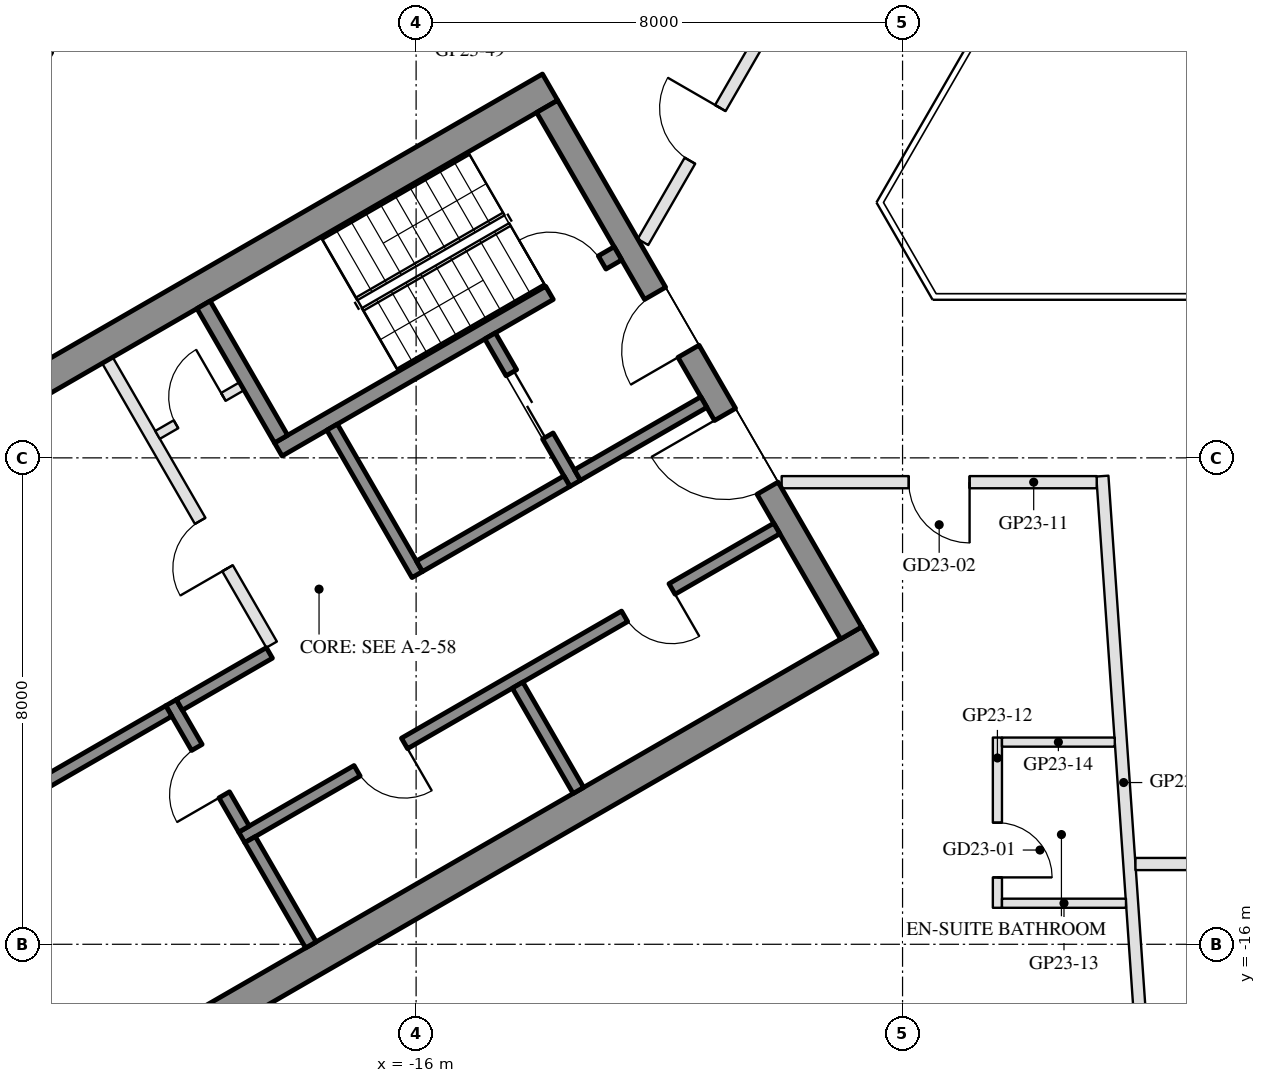
"""IFC4 building model, lengths in metres.
Left out: names, types, materials, properties, quantities, classifications, styles, units other than length and angle.
Written with IfcOpenShell. Run it as: python <this file> out.ifc"""

import sys

from ifc_helpers import new_model, si_unit, direction, frame, frame_2d, origin, place, context, subcontext, project, spatial, rectangle, extrude, element, fill, save


model = new_model("IFC4")
c1 = context("Model", 3, precision=1e-05, world=origin(), true_north=direction((0.0, 1.0)))
c2 = subcontext(c1, "Body", "Model", "MODEL_VIEW")
j1 = project(units=[si_unit("LENGTHUNIT", "METRE"), si_unit("PLANEANGLEUNIT", "RADIAN")], contexts=[c1])
p1 = place(None, origin())
s1 = spatial("IfcSite", under=j1, at=p1, CompositionType="ELEMENT")
p2 = place(p1, origin())
s2 = spatial("IfcBuilding", under=s1, at=p2, CompositionType="ELEMENT")
p3 = place(p2, frame((0.0, 0.0, 250.4)))
s3 = spatial("IfcBuildingStorey", under=s2, at=p3, CompositionType="ELEMENT", Elevation=250.4)
p4 = place(p3, frame((-20.309, 1.934, 0.0), z_axis=(0.0, 0.0, 1.0), x_axis=(-0.499992114976, -0.866029956157, 0.0)))
e1 = element("IfcWall", 1, at=p4, inside=s3, PredefinedType="SOLIDWALL", context=c2, shape_type="SweptSolid", body=[
    extrude(rectangle(XDim=6.74, YDim=0.35, at=frame_2d((3.37, 0.0))), origin(), (0.0, 0.0, 1.0), 3.55),
])
p5 = place(p4, frame((4.02, 0.0, 0.0)))
e2 = element("IfcOpeningElement", 2, at=p5, cuts=e1, PredefinedType="OPENING", context=c2, shape_type="SweptSolid", body=[
    extrude(rectangle(XDim=2.4, YDim=2.4, at=frame_2d((1.2, 1.2))), frame((0.0, 0.185, 0.0), z_axis=(0.0, -1.0, 0.0), x_axis=(1.0, 0.0, 0.0)), (0.0, 0.0, 1.0), 0.37),
])
p6 = place(p4, frame((0.77, 0.0, 0.3)))
e3 = element("IfcOpeningElement", 3, at=p6, cuts=e1, PredefinedType="OPENING", context=c2, shape_type="SweptSolid", body=[
    extrude(rectangle(XDim=2.9, YDim=2.65, at=frame_2d((1.45, 1.325))), frame((0.0, 0.185, 0.0), z_axis=(0.0, -1.0, 0.0), x_axis=(1.0, 0.0, 0.0)), (0.0, 0.0, 1.0), 0.37),
])
for number, where, z_axis, x_axis in (
    (4, (-13.797, -1.903, 0.0), (0.0, 0.0, 1.0), (-0.866, -0.5, 0.0)),
    (5, (-8.547, -10.997, 0.0), (0.0, 0.0, 1.0), (-0.866, -0.5, 0.0)),
):
    element("IfcWall", number, at=place(p3, frame(where, z_axis=z_axis, x_axis=x_axis)), inside=s3, PredefinedType="SHEAR", context=c2, shape_type="SweptSolid", body=[
        extrude(rectangle(XDim=14.837, YDim=0.5, at=frame_2d((7.418, 0.0))), origin(), (0.0, 0.0, 1.0), 3.5),
    ])
p7 = place(p3, frame((-13.845, -2.22, 0.0), z_axis=(0.0, 0.0, 1.0), x_axis=(0.500004234368, -0.866022959057, 0.0)))
e6 = element("IfcWall", 6, at=p7, inside=s3, PredefinedType="SHEAR", context=c2, shape_type="SweptSolid", body=[
    extrude(rectangle(XDim=10.0, YDim=0.4, at=frame_2d((5.0, 0.0))), origin(), (0.0, 0.0, 1.0), 3.5),
])
p8 = place(p7, frame((3.55, 0.0, 0.0)))
e7 = element("IfcOpeningElement", 7, at=p8, cuts=e6, PredefinedType="OPENING", context=c2, shape_type="SweptSolid", body=[
    extrude(rectangle(XDim=1.1, YDim=2.1, at=frame_2d((0.55, 1.05))), frame((0.0, 0.21, 0.0), z_axis=(0.0, -1.0, 0.0), x_axis=(1.0, 0.0, 0.0)), (0.0, 0.0, 1.0), 0.42),
])
p9 = place(p7, frame((5.85, 0.0, 0.0)))
e8 = element("IfcOpeningElement", 8, at=p9, cuts=e6, PredefinedType="OPENING", context=c2, shape_type="SweptSolid", body=[
    extrude(rectangle(XDim=1.4, YDim=2.1, at=frame_2d((0.7, 1.05))), frame((0.0, 0.21, 0.0), z_axis=(0.0, -1.0, 0.0), x_axis=(1.0, 0.0, 0.0)), (0.0, 0.0, 1.0), 0.42),
])
p10 = place(p3, frame((-12.681, -4.636, 0.0), z_axis=(0.0, 0.0, 1.0), x_axis=(-0.866021702275, -0.500006411147, 0.0)))
e9 = element("IfcWall", 9, at=p10, inside=s3, PredefinedType="SHEAR", context=c2, shape_type="SweptSolid", body=[
    extrude(rectangle(XDim=6.45, YDim=0.25, at=frame_2d((3.225, 0.0))), origin(), (0.0, 0.0, 1.0), 3.5),
])
p11 = place(p10, frame((0.3, 0.0, 0.0)))
e10 = element("IfcOpeningElement", 10, at=p11, cuts=e9, PredefinedType="OPENING", context=c2, shape_type="SweptSolid", body=[
    extrude(rectangle(XDim=1.0, YDim=2.1, at=frame_2d((0.5, 1.05))), frame((0.0, 0.135, 0.0), z_axis=(0.0, -1.0, 0.0), x_axis=(1.0, 0.0, 0.0)), (0.0, 0.0, 1.0), 0.27),
])
p12 = place(p3, frame((-19.496, -5.482, 0.0), z_axis=(0.0, 0.0, 1.0), x_axis=(0.499990435942, -0.866030925526, 0.0)))
e11 = element("IfcWall", 11, at=p12, inside=s3, PredefinedType="SHEAR", context=c2, shape_type="SweptSolid", body=[
    extrude(rectangle(XDim=2.55, YDim=0.25, at=frame_2d((1.275, 0.0))), origin(), (0.0, 0.0, 1.0), 3.5),
])
p13 = place(p3, frame((-17.381, -7.495, 0.0), z_axis=(0.0, 0.0, 1.0), x_axis=(0.500011755427, -0.866018616679, 0.0)))
e12 = element("IfcWall", 12, at=p13, inside=s3, PredefinedType="SHEAR", context=c2, shape_type="SweptSolid", body=[
    extrude(rectangle(XDim=2.8, YDim=0.2, at=frame_2d((1.4, 0.0))), origin(), (0.0, 0.0, 1.0), 3.5),
])
p14 = place(p3, frame((-14.783, -5.995, 0.0), z_axis=(0.0, 0.0, 1.0), x_axis=(0.49994636267, -0.866056369097, 0.0)))
e13 = element("IfcWall", 13, at=p14, inside=s3, PredefinedType="SHEAR", context=c2, shape_type="SweptSolid", body=[
    extrude(rectangle(XDim=2.8, YDim=0.2, at=frame_2d((1.4, 0.0))), origin(), (0.0, 0.0, 1.0), 3.5),
])
p15 = place(p14, frame((0.7, 0.0, 0.0)))
e14 = element("IfcOpeningElement", 14, at=p15, cuts=e13, PredefinedType="OPENING", context=c2, shape_type="SweptSolid", body=[
    extrude(rectangle(XDim=1.2, YDim=2.1, at=frame_2d((0.6, 1.05))), frame((0.0, 0.11, 0.0), z_axis=(0.0, -1.0, 0.0), x_axis=(1.0, 0.0, 0.0)), (0.0, 0.0, 1.0), 0.22),
])
p16 = place(p3, frame((-13.52, -8.383, 0.0), z_axis=(0.0, 0.0, 1.0), x_axis=(-0.866034573852, -0.49998411664, 0.0)))
e15 = element("IfcWall", 15, at=p16, inside=s3, PredefinedType="SHEAR", context=c2, shape_type="SweptSolid", body=[
    extrude(rectangle(XDim=2.8, YDim=0.2, at=frame_2d((1.4, 0.0))), origin(), (0.0, 0.0, 1.0), 3.5),
])
p17 = place(p3, frame((-11.268, -7.083, 0.0), z_axis=(0.0, 0.0, 1.0), x_axis=(-0.866050077142, -0.499957262057, 0.0)))
e16 = element("IfcWall", 16, at=p17, inside=s3, PredefinedType="SHEAR", context=c2, shape_type="SweptSolid", body=[
    extrude(rectangle(XDim=2.4, YDim=0.2, at=frame_2d((1.2, 0.0))), origin(), (0.0, 0.0, 1.0), 3.5),
])
p18 = place(p3, frame((-10.068, -9.162, 0.0), z_axis=(0.0, 0.0, 1.0), x_axis=(-0.866032725843, -0.499987317609, 0.0)))
e17 = element("IfcWall", 17, at=p18, inside=s3, PredefinedType="SHEAR", context=c2, shape_type="SweptSolid", body=[
    extrude(rectangle(XDim=10.16, YDim=0.2, at=frame_2d((5.08, 0.0))), origin(), (0.0, 0.0, 1.0), 3.5),
])
p19 = place(p18, frame((1.99, 0.0, 0.0)))
e18 = element("IfcOpeningElement", 18, at=p19, cuts=e17, PredefinedType="OPENING", context=c2, shape_type="SweptSolid", body=[
    extrude(rectangle(XDim=0.9, YDim=2.1, at=frame_2d((0.45, 1.05))), frame((0.0, 0.11, 0.0), z_axis=(0.0, -1.0, 0.0), x_axis=(1.0, 0.0, 0.0)), (0.0, 0.0, 1.0), 0.22),
])
p20 = place(p18, frame((7.07, 0.0, 0.0)))
e19 = element("IfcOpeningElement", 19, at=p20, cuts=e17, PredefinedType="OPENING", context=c2, shape_type="SweptSolid", body=[
    extrude(rectangle(XDim=0.9, YDim=2.1, at=frame_2d((0.45, 1.05))), frame((0.0, 0.11, 0.0), z_axis=(0.0, -1.0, 0.0), x_axis=(1.0, 0.0, 0.0)), (0.0, 0.0, 1.0), 0.22),
])
p21 = place(p3, frame((-20.031, -12.026, 0.0), z_axis=(0.0, 0.0, 1.0), x_axis=(0.500033551112, -0.866006032174, 0.0)))
e20 = element("IfcWall", 20, at=p21, inside=s3, PredefinedType="SHEAR", context=c2, shape_type="SweptSolid", body=[
    extrude(rectangle(XDim=2.4, YDim=0.2, at=frame_2d((1.2, 0.0))), origin(), (0.0, 0.0, 1.0), 3.5),
])
p22 = place(p21, frame((0.85, 0.0, 0.0)))
e21 = element("IfcOpeningElement", 21, at=p22, cuts=e20, PredefinedType="OPENING", context=c2, shape_type="SweptSolid", body=[
    extrude(rectangle(XDim=0.9, YDim=2.1, at=frame_2d((0.45, 1.05))), frame((0.0, 0.11, 0.0), z_axis=(0.0, -1.0, 0.0), x_axis=(1.0, 0.0, 0.0)), (0.0, 0.0, 1.0), 0.22),
])
p23 = place(p3, frame((-18.413, -11.208, 0.0), z_axis=(0.0, 0.0, 1.0), x_axis=(-0.866038183914, -0.499977863513, 0.0)))
e22 = element("IfcWall", 22, at=p23, inside=s3, PredefinedType="SHEAR", context=c2, shape_type="SweptSolid", body=[
    extrude(rectangle(XDim=1.71, YDim=0.2, at=frame_2d((0.855, 0.0))), origin(), (0.0, 0.0, 1.0), 3.5),
])
for number, where, z_axis, x_axis in (
    (23, (-14.331, -11.738, 0.0), (0.0, 0.0, 1.0), (0.5, -0.866, 0.0)),
    (24, (-18.73, -14.278, 0.0), (0.0, 0.0, 1.0), (0.5, -0.866, 0.0)),
):
    element("IfcWall", number, at=place(p3, frame(where, z_axis=z_axis, x_axis=x_axis)), inside=s3, PredefinedType="SHEAR", context=c2, shape_type="SweptSolid", body=[
        extrude(rectangle(XDim=2.0, YDim=0.2, at=frame_2d((1.0, 0.0))), origin(), (0.0, 0.0, 1.0), 3.5),
    ])
p24 = place(p3, frame((-20.067, -12.163, 0.0), z_axis=(0.0, 0.0, 1.0), x_axis=(-0.866030456496, -0.499991248344, 0.0)))
e25 = element("IfcWall", 25, at=p24, inside=s3, PredefinedType="SHEAR", context=c2, shape_type="SweptSolid", body=[
    extrude(rectangle(XDim=3.04, YDim=0.2, at=frame_2d((1.52, 0.0))), origin(), (0.0, 0.0, 1.0), 3.5),
])
p25 = place(p3, frame((-21.076, -6.395, 0.0), z_axis=(0.0, 0.0, 1.0), x_axis=(0.50001468107, -0.866016927499, 0.0)))
e26 = element("IfcWall", 26, at=p25, inside=s3, PredefinedType="PARTITIONING", context=c2, shape_type="SweptSolid", body=[
    extrude(rectangle(XDim=5.4, YDim=0.2, at=frame_2d((2.7, 0.0))), origin(), (0.0, 0.0, 1.0), 3.5),
])
p26 = place(p25, frame((3.05, 0.0, 0.0)))
e27 = element("IfcOpeningElement", 27, at=p26, cuts=e26, PredefinedType="OPENING", context=c2, shape_type="SweptSolid", body=[
    extrude(rectangle(XDim=0.9, YDim=2.1, at=frame_2d((0.45, 1.05))), frame((0.0, 0.11, 0.0), z_axis=(0.0, -1.0, 0.0), x_axis=(1.0, 0.0, 0.0)), (0.0, 0.0, 1.0), 0.22),
])
p27 = place(p3, frame((-18.866, -6.822, 0.0), z_axis=(0.0, 0.0, 1.0), x_axis=(-0.866028054938, -0.499995408039, 0.0)))
e28 = element("IfcWall", 28, at=p27, inside=s3, PredefinedType="PARTITIONING", context=c2, shape_type="SweptSolid", body=[
    extrude(rectangle(XDim=1.6, YDim=0.15, at=frame_2d((0.8, 0.0))), origin(), (0.0, 0.0, 1.0), 3.5),
])
p28 = place(p27, frame((0.35, 0.0, 0.0)))
e29 = element("IfcOpeningElement", 29, at=p28, cuts=e28, PredefinedType="OPENING", context=c2, shape_type="SweptSolid", body=[
    extrude(rectangle(XDim=0.9, YDim=2.1, at=frame_2d((0.45, 1.05))), frame((0.0, 0.085, 0.0), z_axis=(0.0, -1.0, 0.0), x_axis=(1.0, 0.0, 0.0)), (0.0, 0.0, 1.0), 0.17),
])
p29 = place(p3, frame((-4.013, -18.38, 0.0), z_axis=(0.0, 0.0, 1.0), x_axis=(-0.06939415619, 0.997589319854, 0.0)))
e30 = element("IfcWall", 30, at=p29, inside=s3, PredefinedType="PARTITIONING", context=c2, shape_type="SweptSolid", body=[
    extrude(rectangle(XDim=10.104, YDim=0.2, at=frame_2d((5.052, 0.0))), origin(), (0.0, 0.0, 1.0), 2.95),
])
p30 = place(p3, frame((-4.807, -8.4, 0.0), z_axis=(0.0, 0.0, 1.0), x_axis=(-1.0, 0.0, 0.0)))
e31 = element("IfcWall", 31, at=p30, inside=s3, PredefinedType="PARTITIONING", context=c2, shape_type="SweptSolid", body=[
    extrude(rectangle(XDim=5.181, YDim=0.2, at=frame_2d((2.591, 0.0))), origin(), (0.0, 0.0, 1.0), 2.95),
])
p31 = place(p30, frame((2.091, 0.0, 0.0)))
e32 = element("IfcOpeningElement", 32, at=p31, cuts=e31, PredefinedType="OPENING", context=c2, shape_type="SweptSolid", body=[
    extrude(rectangle(XDim=1.0, YDim=2.1, at=frame_2d((0.5, 1.05))), frame((0.0, 0.11, 0.0), z_axis=(0.0, -1.0, 0.0), x_axis=(1.0, 0.0, 0.0)), (0.0, 0.0, 1.0), 0.22),
])
p32 = place(p3, frame((-6.44, -12.6, 0.0), z_axis=(0.0, 0.0, 1.0), x_axis=(0.0, -1.0, 0.0)))
e33 = element("IfcWall", 33, at=p32, inside=s3, PredefinedType="PARTITIONING", context=c2, shape_type="SweptSolid", body=[
    extrude(rectangle(XDim=2.8, YDim=0.15, at=frame_2d((1.4, 0.0))), origin(), (0.0, 0.0, 1.0), 3.55),
])
p33 = place(p32, frame((1.4, 0.0, 0.0)))
e34 = element("IfcOpeningElement", 34, at=p33, cuts=e33, PredefinedType="OPENING", context=c2, shape_type="SweptSolid", body=[
    extrude(rectangle(XDim=0.9, YDim=2.1, at=frame_2d((0.45, 1.05))), frame((0.0, 0.085, 0.0), z_axis=(0.0, -1.0, 0.0), x_axis=(1.0, 0.0, 0.0)), (0.0, 0.0, 1.0), 0.17),
])
p34 = place(p3, frame((-6.365, -15.325, 0.0), z_axis=(0.0, 0.0, 1.0), x_axis=(1.0, 0.0, 0.0)))
e35 = element("IfcWall", 35, at=p34, inside=s3, PredefinedType="PARTITIONING", context=c2, shape_type="SweptSolid", body=[
    extrude(rectangle(XDim=2.04, YDim=0.15, at=frame_2d((1.02, 0.0))), origin(), (0.0, 0.0, 1.0), 3.55),
])
p35 = place(p3, frame((-6.365, -12.675, 0.0), z_axis=(0.0, 0.0, 1.0), x_axis=(1.0, 0.0, 0.0)))
e36 = element("IfcWall", 36, at=p35, inside=s3, PredefinedType="PARTITIONING", context=c2, shape_type="SweptSolid", body=[
    extrude(rectangle(XDim=1.855, YDim=0.15, at=frame_2d((0.928, 0.0))), origin(), (0.0, 0.0, 1.0), 3.55),
])
p36 = place(p3, frame((0.955, -14.68, 0.0), z_axis=(0.0, 0.0, 1.0), x_axis=(-1.0, 0.0, 0.0)))
e37 = element("IfcWall", 37, at=p36, inside=s3, PredefinedType="PARTITIONING", context=c2, shape_type="SweptSolid", body=[
    extrude(rectangle(XDim=5.125, YDim=0.2, at=frame_2d((2.562, 0.0))), origin(), (0.0, 0.0, 1.0), 2.95),
])
p37 = place(p36, frame((2.062, 0.0, 0.0)))
e38 = element("IfcOpeningElement", 38, at=p37, cuts=e37, PredefinedType="OPENING", context=c2, shape_type="SweptSolid", body=[
    extrude(rectangle(XDim=1.0, YDim=2.1, at=frame_2d((0.5, 1.05))), frame((0.0, 0.11, 0.0), z_axis=(0.0, -1.0, 0.0), x_axis=(1.0, 0.0, 0.0)), (0.0, 0.0, 1.0), 0.22),
])
p38 = place(p3, frame((-12.269, -4.45, 0.0), z_axis=(0.0, 0.0, 1.0), x_axis=(0.500011931275, 0.86601851515, 0.0)))
e39 = element("IfcWall", 39, at=p38, inside=s3, PredefinedType="PARTITIONING", context=c2, shape_type="SweptSolid", body=[
    extrude(rectangle(XDim=4.088, YDim=0.2, at=frame_2d((2.044, 0.0))), origin(), (0.0, 0.0, 1.0), 2.95),
])
p39 = place(p38, frame((1.544, 0.0, 0.0)))
e40 = element("IfcOpeningElement", 40, at=p39, cuts=e39, PredefinedType="OPENING", context=c2, shape_type="SweptSolid", body=[
    extrude(rectangle(XDim=1.0, YDim=2.1, at=frame_2d((0.5, 1.05))), frame((0.0, 0.11, 0.0), z_axis=(0.0, -1.0, 0.0), x_axis=(1.0, 0.0, 0.0)), (0.0, 0.0, 1.0), 0.22),
])
p40 = place(p15, origin())
e41 = element("IfcDoor", 41, at=p40, inside=s3, OperationType="DOUBLE_DOOR_SLIDING", PredefinedType="DOOR", context=c2, shape_type="SweptSolid", body=[
    extrude(rectangle(XDim=1.2, YDim=2.1, at=frame_2d((0.6, 1.05))), frame((0.0, 0.025, 0.0), z_axis=(0.0, -1.0, 0.0), x_axis=(1.0, 0.0, 0.0)), (0.0, 0.0, 1.0), 0.05),
])
fill(e14, e41)
p41 = place(p28, frame((0.9, 0.0, 0.0), z_axis=(0.0, 0.0, 1.0), x_axis=(-1.0, 0.0, 0.0)))
e42 = element("IfcDoor", 42, at=p41, inside=s3, OperationType="SINGLE_SWING_RIGHT", PredefinedType="DOOR", context=c2, shape_type="SweptSolid", body=[
    extrude(rectangle(XDim=0.9, YDim=2.1, at=frame_2d((0.45, 1.05))), frame((0.0, 0.025, 0.0), z_axis=(0.0, -1.0, 0.0), x_axis=(1.0, 0.0, 0.0)), (0.0, 0.0, 1.0), 0.05),
])
fill(e29, e42)
p42 = place(p19, origin())
e43 = element("IfcDoor", 43, at=p42, inside=s3, OperationType="SINGLE_SWING_LEFT", PredefinedType="DOOR", context=c2, shape_type="SweptSolid", body=[
    extrude(rectangle(XDim=0.9, YDim=2.1, at=frame_2d((0.45, 1.05))), frame((0.0, 0.025, 0.0), z_axis=(0.0, -1.0, 0.0), x_axis=(1.0, 0.0, 0.0)), (0.0, 0.0, 1.0), 0.05),
])
fill(e18, e43)
p43 = place(p20, origin())
e44 = element("IfcDoor", 44, at=p43, inside=s3, OperationType="SINGLE_SWING_LEFT", PredefinedType="DOOR", context=c2, shape_type="SweptSolid", body=[
    extrude(rectangle(XDim=0.9, YDim=2.1, at=frame_2d((0.45, 1.05))), frame((0.0, 0.025, 0.0), z_axis=(0.0, -1.0, 0.0), x_axis=(1.0, 0.0, 0.0)), (0.0, 0.0, 1.0), 0.05),
])
fill(e19, e44)
p44 = place(p22, frame((0.9, 0.0, 0.0), z_axis=(0.0, 0.0, 1.0), x_axis=(-1.0, 0.0, 0.0)))
e45 = element("IfcDoor", 45, at=p44, inside=s3, OperationType="SINGLE_SWING_LEFT", PredefinedType="DOOR", context=c2, shape_type="SweptSolid", body=[
    extrude(rectangle(XDim=0.9, YDim=2.1, at=frame_2d((0.45, 1.05))), frame((0.0, 0.025, 0.0), z_axis=(0.0, -1.0, 0.0), x_axis=(1.0, 0.0, 0.0)), (0.0, 0.0, 1.0), 0.05),
])
fill(e21, e45)
p45 = place(p26, frame((0.9, 0.0, 0.0), z_axis=(0.0, 0.0, 1.0), x_axis=(-1.0, 0.0, 0.0)))
e46 = element("IfcDoor", 46, at=p45, inside=s3, OperationType="SINGLE_SWING_LEFT", PredefinedType="DOOR", context=c2, shape_type="SweptSolid", body=[
    extrude(rectangle(XDim=0.9, YDim=2.1, at=frame_2d((0.45, 1.05))), frame((0.0, 0.025, 0.0), z_axis=(0.0, -1.0, 0.0), x_axis=(1.0, 0.0, 0.0)), (0.0, 0.0, 1.0), 0.05),
])
fill(e27, e46)
p46 = place(p8, frame((1.1, 0.0, 0.0), z_axis=(0.0, 0.0, 1.0), x_axis=(-1.0, 0.0, 0.0)))
e47 = element("IfcDoor", 47, at=p46, inside=s3, OperationType="SINGLE_SWING_LEFT", PredefinedType="DOOR", context=c2, shape_type="SweptSolid", body=[
    extrude(rectangle(XDim=1.1, YDim=2.1, at=frame_2d((0.55, 1.05))), frame((0.0, 0.025, 0.0), z_axis=(0.0, -1.0, 0.0), x_axis=(1.0, 0.0, 0.0)), (0.0, 0.0, 1.0), 0.05),
])
fill(e7, e47)
p47 = place(p9, frame((1.4, 0.0, 0.0), z_axis=(0.0, 0.0, 1.0), x_axis=(-1.0, 0.0, 0.0)))
e48 = element("IfcDoor", 48, at=p47, inside=s3, OperationType="DOUBLE_DOOR_SINGLE_SWING", PredefinedType="DOOR", context=c2, shape_type="SweptSolid", body=[
    extrude(rectangle(XDim=1.4, YDim=2.1, at=frame_2d((0.7, 1.05))), frame((0.0, 0.025, 0.0), z_axis=(0.0, -1.0, 0.0), x_axis=(1.0, 0.0, 0.0)), (0.0, 0.0, 1.0), 0.05),
])
fill(e8, e48)
p48 = place(p11, frame((1.0, 0.0, 0.0), z_axis=(0.0, 0.0, 1.0), x_axis=(-1.0, 0.0, 0.0)))
e49 = element("IfcDoor", 49, at=p48, inside=s3, OperationType="SINGLE_SWING_LEFT", PredefinedType="DOOR", context=c2, shape_type="SweptSolid", body=[
    extrude(rectangle(XDim=1.0, YDim=2.1, at=frame_2d((0.5, 1.05))), frame((0.0, 0.025, 0.0), z_axis=(0.0, -1.0, 0.0), x_axis=(1.0, 0.0, 0.0)), (0.0, 0.0, 1.0), 0.05),
])
fill(e10, e49)
p49 = place(p33, origin())
e50 = element("IfcDoor", 50, at=p49, inside=s3, OperationType="SINGLE_SWING_RIGHT", PredefinedType="DOOR", context=c2, shape_type="SweptSolid", body=[
    extrude(rectangle(XDim=0.9, YDim=2.1, at=frame_2d((0.45, 1.05))), frame((0.0, 0.025, 0.0), z_axis=(0.0, -1.0, 0.0), x_axis=(1.0, 0.0, 0.0)), (0.0, 0.0, 1.0), 0.05),
])
fill(e34, e50)
p50 = place(p31, origin())
e51 = element("IfcDoor", 51, at=p50, inside=s3, OperationType="SINGLE_SWING_LEFT", PredefinedType="DOOR", context=c2, shape_type="SweptSolid", body=[
    extrude(rectangle(XDim=1.0, YDim=2.1, at=frame_2d((0.5, 1.05))), frame((0.0, 0.025, 0.0), z_axis=(0.0, -1.0, 0.0), x_axis=(1.0, 0.0, 0.0)), (0.0, 0.0, 1.0), 0.05),
])
fill(e32, e51)
p51 = place(p39, origin())
e52 = element("IfcDoor", 52, at=p51, inside=s3, OperationType="SINGLE_SWING_RIGHT", PredefinedType="DOOR", context=c2, shape_type="SweptSolid", body=[
    extrude(rectangle(XDim=1.0, YDim=2.1, at=frame_2d((0.5, 1.05))), frame((0.0, 0.025, 0.0), z_axis=(0.0, -1.0, 0.0), x_axis=(1.0, 0.0, 0.0)), (0.0, 0.0, 1.0), 0.05),
])
fill(e40, e52)
save(model, sys.argv[1])
